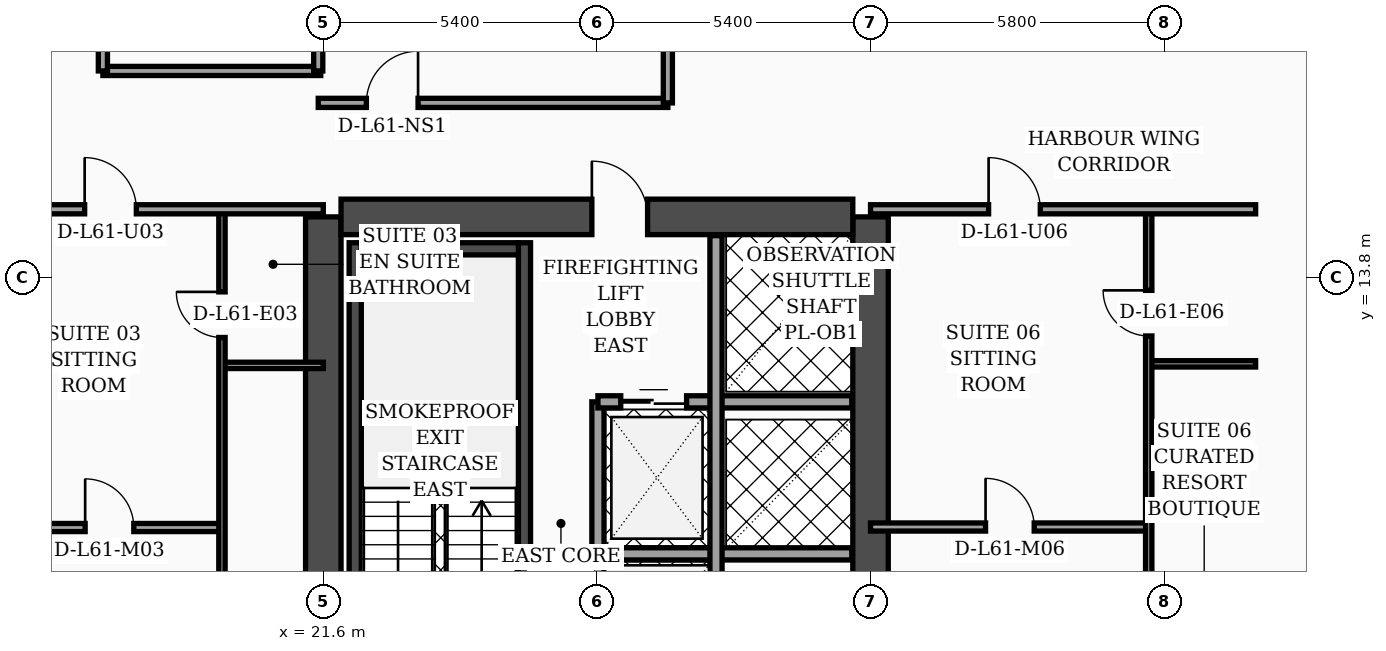
"""IFC4 building model, lengths in metres.
Left out: names, types, materials, properties, quantities, classifications, styles, units other than length and angle.
Written with IfcOpenShell. Run it as: python <this file> out.ifc"""

import sys

from ifc_helpers import new_model, si_unit, direction, frame, frame_2d, origin, place, context, subcontext, project, spatial, rectangle, extrude, element, fill, save


model = new_model("IFC4")
c1 = context("Model", 3, precision=1e-05, world=origin(), true_north=direction((0.0, 1.0)))
c2 = subcontext(c1, "Body", "Model", "MODEL_VIEW")
j1 = project(units=[si_unit("LENGTHUNIT", "METRE"), si_unit("PLANEANGLEUNIT", "RADIAN")], contexts=[c1])
p1 = place(None, origin())
s1 = spatial("IfcSite", under=j1, at=p1, CompositionType="ELEMENT")
p2 = place(p1, origin())
s2 = spatial("IfcBuilding", under=s1, at=p2, CompositionType="ELEMENT")
p3 = place(p2, frame((0.0, 0.0, 247.6)))
s3 = spatial("IfcBuildingStorey", under=s2, at=p3, CompositionType="ELEMENT", Elevation=247.6)
for number, where, z_axis, x_axis in (
    (1, (21.6, 4.6, 0.0), (0.0, 0.0, 1.0), (0.0, 1.0, 0.0)),
    (2, (32.4, 4.6, 0.0), (0.0, 0.0, 1.0), (0.0, 1.0, 0.0)),
):
    element("IfcWall", number, at=place(p3, frame(where, z_axis=z_axis, x_axis=x_axis)), inside=s3, PredefinedType="SHEAR", context=c2, shape_type="SweptSolid", body=[
        extrude(rectangle(XDim=10.4, YDim=0.7, at=frame_2d((5.2, 0.0))), origin(), (0.0, 0.0, 1.0), 3.56),
    ])
p4 = place(p3, frame((21.95, 15.0, 0.0), z_axis=(0.0, 0.0, 1.0), x_axis=(1.0, 0.0, 0.0)))
e3 = element("IfcWall", 3, at=p4, inside=s3, PredefinedType="SHEAR", context=c2, shape_type="SweptSolid", body=[
    extrude(rectangle(XDim=10.1, YDim=0.7, at=frame_2d((5.05, 0.0))), origin(), (0.0, 0.0, 1.0), 3.56),
])
p5 = place(p4, frame((4.95, 0.0, 0.0)))
e4 = element("IfcOpeningElement", 4, at=p5, cuts=e3, PredefinedType="OPENING", context=c2, shape_type="SweptSolid", body=[
    extrude(rectangle(XDim=1.1, YDim=2.2, at=frame_2d((0.55, 1.1))), frame((0.0, 0.36, 0.0), z_axis=(0.0, -1.0, 0.0), x_axis=(1.0, 0.0, 0.0)), (0.0, 0.0, 1.0), 0.72),
])
p6 = place(p3, frame((22.23, 4.95, 0.0), z_axis=(0.0, 0.0, 1.0), x_axis=(0.0, 1.0, 0.0)))
e5 = element("IfcWall", 5, at=p6, inside=s3, PredefinedType="SOLIDWALL", context=c2, shape_type="SweptSolid", body=[
    extrude(rectangle(XDim=9.54, YDim=0.24, at=frame_2d((4.77, 0.0))), origin(), (0.0, 0.0, 1.0), 3.56),
])
p7 = place(p3, frame((25.57, 4.95, 0.0), z_axis=(0.0, 0.0, 1.0), x_axis=(0.0, 1.0, 0.0)))
e6 = element("IfcWall", 6, at=p7, inside=s3, PredefinedType="SOLIDWALL", context=c2, shape_type="SweptSolid", body=[
    extrude(rectangle(XDim=9.54, YDim=0.24, at=frame_2d((4.77, 0.0))), origin(), (0.0, 0.0, 1.0), 3.56),
])
p8 = place(p7, frame((0.35, 0.0, 0.0)))
e7 = element("IfcOpeningElement", 7, at=p8, cuts=e6, PredefinedType="OPENING", context=c2, shape_type="SweptSolid", body=[
    extrude(rectangle(XDim=1.15, YDim=2.2, at=frame_2d((0.575, 1.1))), frame((0.0, 0.13, 0.0), z_axis=(0.0, -1.0, 0.0), x_axis=(1.0, 0.0, 0.0)), (0.0, 0.0, 1.0), 0.26),
])
p9 = place(p3, frame((22.35, 14.37, 0.0), z_axis=(0.0, 0.0, 1.0), x_axis=(1.0, 0.0, 0.0)))
e8 = element("IfcWall", 8, at=p9, inside=s3, PredefinedType="SOLIDWALL", context=c2, shape_type="SweptSolid", body=[
    extrude(rectangle(XDim=3.1, YDim=0.24, at=frame_2d((1.55, 0.0))), origin(), (0.0, 0.0, 1.0), 3.56),
])
p10 = place(p3, frame((46.63, 5.505, 0.0), z_axis=(0.0, 0.0, 1.0), x_axis=(-0.300501856448, 0.953781229775, 0.0)))
e9 = element("IfcWall", 9, at=p10, inside=s3, PredefinedType="SOLIDWALL", context=c2, shape_type="SweptSolid", body=[
    extrude(rectangle(XDim=30.814, YDim=0.32, at=frame_2d((15.407, 0.0))), origin(), (0.0, 0.0, 1.0), 3.56),
])
p11 = place(p10, frame((10.199, 0.0, 0.0)))
e10 = element("IfcOpeningElement", 10, at=p11, cuts=e9, PredefinedType="OPENING", context=c2, shape_type="SweptSolid", body=[
    extrude(rectangle(XDim=1.4, YDim=2.25, at=frame_2d((0.7, 1.125))), frame((0.0, 0.17, 0.0), z_axis=(0.0, -1.0, 0.0), x_axis=(1.0, 0.0, 0.0)), (0.0, 0.0, 1.0), 0.34),
])
p12 = place(p10, frame((4.437, 0.0, 0.7)))
e11 = element("IfcOpeningElement", 11, at=p12, cuts=e9, PredefinedType="OPENING", context=c2, shape_type="SweptSolid", body=[
    extrude(rectangle(XDim=1.6, YDim=1.65, at=frame_2d((0.8, 0.825))), frame((0.0, 0.17, 0.0), z_axis=(0.0, -1.0, 0.0), x_axis=(1.0, 0.0, 0.0)), (0.0, 0.0, 1.0), 0.34),
])
p13 = place(p10, frame((18.696, 0.0, 0.7)))
e12 = element("IfcOpeningElement", 12, at=p13, cuts=e9, PredefinedType="OPENING", context=c2, shape_type="SweptSolid", body=[
    extrude(rectangle(XDim=1.6, YDim=1.65, at=frame_2d((0.8, 0.825))), frame((0.0, 0.17, 0.0), z_axis=(0.0, -1.0, 0.0), x_axis=(1.0, 0.0, 0.0)), (0.0, 0.0, 1.0), 0.34),
])
p14 = place(p10, frame((1.6, 0.0, 0.75)))
e13 = element("IfcOpeningElement", 13, at=p14, cuts=e9, PredefinedType="OPENING", context=c2, shape_type="SweptSolid", body=[
    extrude(rectangle(XDim=1.5, YDim=1.6, at=frame_2d((0.75, 0.8))), frame((0.0, 0.17, 0.0), z_axis=(0.0, -1.0, 0.0), x_axis=(1.0, 0.0, 0.0)), (0.0, 0.0, 1.0), 0.34),
])
p15 = place(p10, frame((7.8, 0.0, 0.75)))
e14 = element("IfcOpeningElement", 14, at=p15, cuts=e9, PredefinedType="OPENING", context=c2, shape_type="SweptSolid", body=[
    extrude(rectangle(XDim=1.5, YDim=1.6, at=frame_2d((0.75, 0.8))), frame((0.0, 0.17, 0.0), z_axis=(0.0, -1.0, 0.0), x_axis=(1.0, 0.0, 0.0)), (0.0, 0.0, 1.0), 0.34),
])
p16 = place(p10, frame((14.0, 0.0, 0.75)))
e15 = element("IfcOpeningElement", 15, at=p16, cuts=e9, PredefinedType="OPENING", context=c2, shape_type="SweptSolid", body=[
    extrude(rectangle(XDim=1.5, YDim=1.6, at=frame_2d((0.75, 0.8))), frame((0.0, 0.17, 0.0), z_axis=(0.0, -1.0, 0.0), x_axis=(1.0, 0.0, 0.0)), (0.0, 0.0, 1.0), 0.34),
])
p17 = place(p10, frame((16.55, 0.0, 0.75)))
e16 = element("IfcOpeningElement", 16, at=p17, cuts=e9, PredefinedType="OPENING", context=c2, shape_type="SweptSolid", body=[
    extrude(rectangle(XDim=1.5, YDim=1.6, at=frame_2d((0.75, 0.8))), frame((0.0, 0.17, 0.0), z_axis=(0.0, -1.0, 0.0), x_axis=(1.0, 0.0, 0.0)), (0.0, 0.0, 1.0), 0.34),
])
p18 = place(p10, frame((20.75, 0.0, 0.75)))
e17 = element("IfcOpeningElement", 17, at=p18, cuts=e9, PredefinedType="OPENING", context=c2, shape_type="SweptSolid", body=[
    extrude(rectangle(XDim=1.5, YDim=1.6, at=frame_2d((0.75, 0.8))), frame((0.0, 0.17, 0.0), z_axis=(0.0, -1.0, 0.0), x_axis=(1.0, 0.0, 0.0)), (0.0, 0.0, 1.0), 0.34),
])
p19 = place(p10, frame((23.3, 0.0, 0.75)))
e18 = element("IfcOpeningElement", 18, at=p19, cuts=e9, PredefinedType="OPENING", context=c2, shape_type="SweptSolid", body=[
    extrude(rectangle(XDim=1.5, YDim=1.6, at=frame_2d((0.75, 0.8))), frame((0.0, 0.17, 0.0), z_axis=(0.0, -1.0, 0.0), x_axis=(1.0, 0.0, 0.0)), (0.0, 0.0, 1.0), 0.34),
])
p20 = place(p10, frame((26.4, 0.0, 0.75)))
e19 = element("IfcOpeningElement", 19, at=p20, cuts=e9, PredefinedType="OPENING", context=c2, shape_type="SweptSolid", body=[
    extrude(rectangle(XDim=1.5, YDim=1.6, at=frame_2d((0.75, 0.8))), frame((0.0, 0.17, 0.0), z_axis=(0.0, -1.0, 0.0), x_axis=(1.0, 0.0, 0.0)), (0.0, 0.0, 1.0), 0.34),
])
p21 = place(p3, frame((27.02, 4.97, 0.0), z_axis=(0.0, 0.0, 1.0), x_axis=(0.0, 1.0, 0.0)))
e20 = element("IfcWall", 20, at=p21, inside=s3, PredefinedType="SOLIDWALL", context=c2, shape_type="SweptSolid", body=[
    extrude(rectangle(XDim=6.38, YDim=0.24, at=frame_2d((3.19, 0.0))), origin(), (0.0, 0.0, 1.0), 3.56),
])
p22 = place(p3, frame((27.02, 11.35, 0.0), z_axis=(0.0, 0.0, 1.0), x_axis=(1.0, 0.0, 0.0)))
e21 = element("IfcWall", 21, at=p22, inside=s3, PredefinedType="SOLIDWALL", context=c2, shape_type="SweptSolid", body=[
    extrude(rectangle(XDim=5.01, YDim=0.24, at=frame_2d((2.505, 0.0))), origin(), (0.0, 0.0, 1.0), 3.56),
])
p23 = place(p22, frame((0.45, 0.0, 0.0)))
e22 = element("IfcOpeningElement", 22, at=p23, cuts=e21, PredefinedType="OPENING", context=c2, shape_type="SweptSolid", body=[
    extrude(rectangle(XDim=1.3, YDim=2.35, at=frame_2d((0.65, 1.175))), frame((0.0, 0.13, 0.0), z_axis=(0.0, -1.0, 0.0), x_axis=(1.0, 0.0, 0.0)), (0.0, 0.0, 1.0), 0.26),
])
p24 = place(p3, frame((27.02, 8.35, 0.0), z_axis=(0.0, 0.0, 1.0), x_axis=(1.0, 0.0, 0.0)))
e23 = element("IfcWall", 23, at=p24, inside=s3, PredefinedType="SOLIDWALL", context=c2, shape_type="SweptSolid", body=[
    extrude(rectangle(XDim=5.01, YDim=0.24, at=frame_2d((2.505, 0.0))), origin(), (0.0, 0.0, 1.0), 3.56),
])
p25 = place(p3, frame((29.35, 4.97, 0.0), z_axis=(0.0, 0.0, 1.0), x_axis=(0.0, 1.0, 0.0)))
e24 = element("IfcWall", 24, at=p25, inside=s3, PredefinedType="SOLIDWALL", context=c2, shape_type="SweptSolid", body=[
    extrude(rectangle(XDim=9.66, YDim=0.24, at=frame_2d((4.83, 0.0))), origin(), (0.0, 0.0, 1.0), 3.56),
])
p26 = place(p25, frame((0.55, 0.0, 0.0)))
e25 = element("IfcOpeningElement", 25, at=p26, cuts=e24, PredefinedType="OPENING", context=c2, shape_type="SweptSolid", body=[
    extrude(rectangle(XDim=1.3, YDim=2.35, at=frame_2d((0.65, 1.175))), frame((0.0, 0.13, 0.0), z_axis=(0.0, -1.0, 0.0), x_axis=(1.0, 0.0, 0.0)), (0.0, 0.0, 1.0), 0.26),
])
p27 = place(p3, frame((19.6, 12.07, 0.0), z_axis=(0.0, 0.0, 1.0), x_axis=(1.0, 0.0, 0.0)))
e26 = element("IfcWall", 26, at=p27, inside=s3, PredefinedType="PARTITIONING", context=c2, shape_type="SweptSolid", body=[
    extrude(rectangle(XDim=2.0, YDim=0.125, at=frame_2d((1.0, 0.0))), origin(), (0.0, 0.0, 1.0), 3.56),
])
p28 = place(p3, frame((15.15, 8.87, 0.0), z_axis=(0.0, 0.0, 1.0), x_axis=(1.0, 0.0, 0.0)))
e27 = element("IfcWall", 27, at=p28, inside=s3, PredefinedType="PARTITIONING", context=c2, shape_type="SweptSolid", body=[
    extrude(rectangle(XDim=4.45, YDim=0.16, at=frame_2d((2.225, 0.0))), origin(), (0.0, 0.0, 1.0), 3.56),
])
p29 = place(p28, frame((1.75, 0.0, 0.0)))
e28 = element("IfcOpeningElement", 28, at=p29, cuts=e27, PredefinedType="OPENING", context=c2, shape_type="SweptSolid", body=[
    extrude(rectangle(XDim=0.96, YDim=2.2, at=frame_2d((0.48, 1.1))), frame((0.0, 0.09, 0.0), z_axis=(0.0, -1.0, 0.0), x_axis=(1.0, 0.0, 0.0)), (0.0, 0.0, 1.0), 0.18),
])
p30 = place(p3, frame((19.6, 2.44, 0.0), z_axis=(0.0, 0.0, 1.0), x_axis=(0.0, 1.0, 0.0)))
e29 = element("IfcWall", 29, at=p30, inside=s3, PredefinedType="PARTITIONING", context=c2, shape_type="SweptSolid", body=[
    extrude(rectangle(XDim=12.71, YDim=0.125, at=frame_2d((6.355, 0.0))), origin(), (0.0, 0.0, 1.0), 2.59),
])
p31 = place(p30, frame((4.34, 0.0, 0.0)))
e30 = element("IfcOpeningElement", 30, at=p31, cuts=e29, PredefinedType="OPENING", context=c2, shape_type="SweptSolid", body=[
    extrude(rectangle(XDim=0.96, YDim=2.2, at=frame_2d((0.48, 1.1))), frame((0.0, 0.073, 0.0), z_axis=(0.0, -1.0, 0.0), x_axis=(1.0, 0.0, 0.0)), (0.0, 0.0, 1.0), 0.145),
])
p32 = place(p30, frame((10.18, 0.0, 0.0)))
e31 = element("IfcOpeningElement", 31, at=p32, cuts=e29, PredefinedType="OPENING", context=c2, shape_type="SweptSolid", body=[
    extrude(rectangle(XDim=0.9, YDim=2.15, at=frame_2d((0.45, 1.075))), frame((0.0, 0.073, 0.0), z_axis=(0.0, -1.0, 0.0), x_axis=(1.0, 0.0, 0.0)), (0.0, 0.0, 1.0), 0.145),
])
p33 = place(p3, frame((15.15, 15.15, 0.0), z_axis=(0.0, 0.0, 1.0), x_axis=(1.0, 0.0, 0.0)))
e32 = element("IfcWall", 32, at=p33, inside=s3, PredefinedType="PARTITIONING", context=c2, shape_type="SweptSolid", body=[
    extrude(rectangle(XDim=6.45, YDim=0.18, at=frame_2d((3.225, 0.0))), origin(), (0.0, 0.0, 1.0), 2.59),
])
p34 = place(p33, frame((1.74, 0.0, 0.0)))
e33 = element("IfcOpeningElement", 33, at=p34, cuts=e32, PredefinedType="OPENING", context=c2, shape_type="SweptSolid", body=[
    extrude(rectangle(XDim=1.02, YDim=2.2, at=frame_2d((0.51, 1.1))), frame((0.0, 0.1, 0.0), z_axis=(0.0, -1.0, 0.0), x_axis=(1.0, 0.0, 0.0)), (0.0, 0.0, 1.0), 0.2),
])
p35 = place(p3, frame((17.25, 17.88, 0.0), z_axis=(0.0, 0.0, 1.0), x_axis=(1.0, 0.0, 0.0)))
e34 = element("IfcWall", 34, at=p35, inside=s3, PredefinedType="PARTITIONING", context=c2, shape_type="SweptSolid", body=[
    extrude(rectangle(XDim=4.3, YDim=0.18, at=frame_2d((2.15, 0.0))), origin(), (0.0, 0.0, 1.0), 3.09),
])
p36 = place(p3, frame((21.5, 17.88, 0.0), z_axis=(0.0, 0.0, 1.0), x_axis=(0.0, 1.0, 0.0)))
e35 = element("IfcWall", 35, at=p36, inside=s3, PredefinedType="PARTITIONING", context=c2, shape_type="SweptSolid", body=[
    extrude(rectangle(XDim=6.44, YDim=0.18, at=frame_2d((3.22, 0.0))), origin(), (0.0, 0.0, 1.0), 3.09),
])
p37 = place(p3, frame((17.25, 17.88, 0.0), z_axis=(0.0, 0.0, 1.0), x_axis=(0.0, 1.0, 0.0)))
e36 = element("IfcWall", 36, at=p37, inside=s3, PredefinedType="PARTITIONING", context=c2, shape_type="SweptSolid", body=[
    extrude(rectangle(XDim=6.44, YDim=0.18, at=frame_2d((3.22, 0.0))), origin(), (0.0, 0.0, 1.0), 3.09),
])
p38 = place(p37, frame((0.65, 0.0, 0.0)))
e37 = element("IfcOpeningElement", 37, at=p38, cuts=e36, PredefinedType="OPENING", context=c2, shape_type="SweptSolid", body=[
    extrude(rectangle(XDim=0.98, YDim=2.15, at=frame_2d((0.49, 1.075))), frame((0.0, 0.1, 0.0), z_axis=(0.0, -1.0, 0.0), x_axis=(1.0, 0.0, 0.0)), (0.0, 0.0, 1.0), 0.2),
])
p39 = place(p37, frame((3.27, 0.0, 0.0)))
e38 = element("IfcOpeningElement", 38, at=p39, cuts=e36, PredefinedType="OPENING", context=c2, shape_type="SweptSolid", body=[
    extrude(rectangle(XDim=0.96, YDim=2.2, at=frame_2d((0.48, 1.1))), frame((0.0, 0.1, 0.0), z_axis=(0.0, -1.0, 0.0), x_axis=(1.0, 0.0, 0.0)), (0.0, 0.0, 1.0), 0.2),
])
p40 = place(p3, frame((37.89, 12.1, 0.0), z_axis=(0.0, 0.0, 1.0), x_axis=(1.0, 0.0, 0.0)))
e39 = element("IfcWall", 39, at=p40, inside=s3, PredefinedType="PARTITIONING", context=c2, shape_type="SweptSolid", body=[
    extrude(rectangle(XDim=2.11, YDim=0.125, at=frame_2d((1.055, 0.0))), origin(), (0.0, 0.0, 1.0), 3.56),
])
p41 = place(p3, frame((32.4, 8.88, 0.0), z_axis=(0.0, 0.0, 1.0), x_axis=(1.0, 0.0, 0.0)))
e40 = element("IfcWall", 40, at=p41, inside=s3, PredefinedType="PARTITIONING", context=c2, shape_type="SweptSolid", body=[
    extrude(rectangle(XDim=5.49, YDim=0.16, at=frame_2d((2.745, 0.0))), origin(), (0.0, 0.0, 1.0), 2.99),
])
p42 = place(p41, frame((2.27, 0.0, 0.0)))
e41 = element("IfcOpeningElement", 41, at=p42, cuts=e40, PredefinedType="OPENING", context=c2, shape_type="SweptSolid", body=[
    extrude(rectangle(XDim=0.96, YDim=2.2, at=frame_2d((0.48, 1.1))), frame((0.0, 0.09, 0.0), z_axis=(0.0, -1.0, 0.0), x_axis=(1.0, 0.0, 0.0)), (0.0, 0.0, 1.0), 0.18),
])
p43 = place(p3, frame((37.89, 2.44, 0.0), z_axis=(0.0, 0.0, 1.0), x_axis=(0.0, 1.0, 0.0)))
e42 = element("IfcWall", 42, at=p43, inside=s3, PredefinedType="PARTITIONING", context=c2, shape_type="SweptSolid", body=[
    extrude(rectangle(XDim=12.71, YDim=0.125, at=frame_2d((6.355, 0.0))), origin(), (0.0, 0.0, 1.0), 2.99),
])
p44 = place(p43, frame((4.35, 0.0, 0.0)))
e43 = element("IfcOpeningElement", 43, at=p44, cuts=e42, PredefinedType="OPENING", context=c2, shape_type="SweptSolid", body=[
    extrude(rectangle(XDim=0.96, YDim=2.2, at=frame_2d((0.48, 1.1))), frame((0.0, 0.073, 0.0), z_axis=(0.0, -1.0, 0.0), x_axis=(1.0, 0.0, 0.0)), (0.0, 0.0, 1.0), 0.145),
])
p45 = place(p43, frame((10.21, 0.0, 0.0)))
e44 = element("IfcOpeningElement", 44, at=p45, cuts=e42, PredefinedType="OPENING", context=c2, shape_type="SweptSolid", body=[
    extrude(rectangle(XDim=0.9, YDim=2.15, at=frame_2d((0.45, 1.075))), frame((0.0, 0.073, 0.0), z_axis=(0.0, -1.0, 0.0), x_axis=(1.0, 0.0, 0.0)), (0.0, 0.0, 1.0), 0.145),
])
p46 = place(p3, frame((32.4, 15.15, 0.0), z_axis=(0.0, 0.0, 1.0), x_axis=(1.0, 0.0, 0.0)))
e45 = element("IfcWall", 45, at=p46, inside=s3, PredefinedType="PARTITIONING", context=c2, shape_type="SweptSolid", body=[
    extrude(rectangle(XDim=7.6, YDim=0.18, at=frame_2d((3.8, 0.0))), origin(), (0.0, 0.0, 1.0), 2.99),
])
p47 = place(p46, frame((2.33, 0.0, 0.0)))
e46 = element("IfcOpeningElement", 46, at=p47, cuts=e45, PredefinedType="OPENING", context=c2, shape_type="SweptSolid", body=[
    extrude(rectangle(XDim=1.02, YDim=2.2, at=frame_2d((0.51, 1.1))), frame((0.0, 0.1, 0.0), z_axis=(0.0, -1.0, 0.0), x_axis=(1.0, 0.0, 0.0)), (0.0, 0.0, 1.0), 0.2),
])
p48 = place(p3, frame((21.5, 17.25, 0.0), z_axis=(0.0, 0.0, 1.0), x_axis=(1.0, 0.0, 0.0)))
e47 = element("IfcWall", 47, at=p48, inside=s3, PredefinedType="PARTITIONING", context=c2, shape_type="SweptSolid", body=[
    extrude(rectangle(XDim=6.9, YDim=0.18, at=frame_2d((3.45, 0.0))), origin(), (0.0, 0.0, 1.0), 2.99),
])
p49 = place(p48, frame((0.95, 0.0, 0.0)))
e48 = element("IfcOpeningElement", 48, at=p49, cuts=e47, PredefinedType="OPENING", context=c2, shape_type="SweptSolid", body=[
    extrude(rectangle(XDim=1.02, YDim=2.2, at=frame_2d((0.51, 1.1))), frame((0.0, 0.1, 0.0), z_axis=(0.0, -1.0, 0.0), x_axis=(1.0, 0.0, 0.0)), (0.0, 0.0, 1.0), 0.2),
])
p50 = place(p3, frame((28.4, 17.25, 0.0), z_axis=(0.0, 0.0, 1.0), x_axis=(0.0, 1.0, 0.0)))
e49 = element("IfcWall", 49, at=p50, inside=s3, PredefinedType="PARTITIONING", context=c2, shape_type="SweptSolid", body=[
    extrude(rectangle(XDim=15.07, YDim=0.18, at=frame_2d((7.535, 0.0))), origin(), (0.0, 0.0, 1.0), 2.99),
])
p51 = place(p23, origin())
e50 = element("IfcDoor", 50, at=p51, inside=s3, OperationType="DOUBLE_DOOR_SLIDING", PredefinedType="DOOR", context=c2, shape_type="SweptSolid", body=[
    extrude(rectangle(XDim=1.3, YDim=2.35, at=frame_2d((0.65, 1.175))), frame((0.0, 0.025, 0.0), z_axis=(0.0, -1.0, 0.0), x_axis=(1.0, 0.0, 0.0)), (0.0, 0.0, 1.0), 0.05),
])
fill(e22, e50)
p52 = place(p29, origin())
e51 = element("IfcDoor", 51, at=p52, inside=s3, OperationType="SINGLE_SWING_LEFT", PredefinedType="DOOR", context=c2, shape_type="SweptSolid", body=[
    extrude(rectangle(XDim=0.96, YDim=2.2, at=frame_2d((0.48, 1.1))), frame((0.0, 0.025, 0.0), z_axis=(0.0, -1.0, 0.0), x_axis=(1.0, 0.0, 0.0)), (0.0, 0.0, 1.0), 0.05),
])
fill(e28, e51)
p53 = place(p32, origin())
e52 = element("IfcDoor", 52, at=p53, inside=s3, OperationType="SINGLE_SWING_RIGHT", PredefinedType="DOOR", context=c2, shape_type="SweptSolid", body=[
    extrude(rectangle(XDim=0.9, YDim=2.15, at=frame_2d((0.45, 1.075))), frame((0.0, 0.025, 0.0), z_axis=(0.0, -1.0, 0.0), x_axis=(1.0, 0.0, 0.0)), (0.0, 0.0, 1.0), 0.05),
])
fill(e31, e52)
p54 = place(p34, origin())
e53 = element("IfcDoor", 53, at=p54, inside=s3, OperationType="SINGLE_SWING_LEFT", PredefinedType="DOOR", context=c2, shape_type="SweptSolid", body=[
    extrude(rectangle(XDim=1.02, YDim=2.2, at=frame_2d((0.51, 1.1))), frame((0.0, 0.025, 0.0), z_axis=(0.0, -1.0, 0.0), x_axis=(1.0, 0.0, 0.0)), (0.0, 0.0, 1.0), 0.05),
])
fill(e33, e53)
p55 = place(p42, origin())
e54 = element("IfcDoor", 54, at=p55, inside=s3, OperationType="SINGLE_SWING_LEFT", PredefinedType="DOOR", context=c2, shape_type="SweptSolid", body=[
    extrude(rectangle(XDim=0.96, YDim=2.2, at=frame_2d((0.48, 1.1))), frame((0.0, 0.025, 0.0), z_axis=(0.0, -1.0, 0.0), x_axis=(1.0, 0.0, 0.0)), (0.0, 0.0, 1.0), 0.05),
])
fill(e41, e54)
p56 = place(p45, origin())
e55 = element("IfcDoor", 55, at=p56, inside=s3, OperationType="SINGLE_SWING_RIGHT", PredefinedType="DOOR", context=c2, shape_type="SweptSolid", body=[
    extrude(rectangle(XDim=0.9, YDim=2.15, at=frame_2d((0.45, 1.075))), frame((0.0, 0.025, 0.0), z_axis=(0.0, -1.0, 0.0), x_axis=(1.0, 0.0, 0.0)), (0.0, 0.0, 1.0), 0.05),
])
fill(e44, e55)
p57 = place(p47, origin())
e56 = element("IfcDoor", 56, at=p57, inside=s3, OperationType="SINGLE_SWING_LEFT", PredefinedType="DOOR", context=c2, shape_type="SweptSolid", body=[
    extrude(rectangle(XDim=1.02, YDim=2.2, at=frame_2d((0.51, 1.1))), frame((0.0, 0.025, 0.0), z_axis=(0.0, -1.0, 0.0), x_axis=(1.0, 0.0, 0.0)), (0.0, 0.0, 1.0), 0.05),
])
fill(e46, e56)
p58 = place(p49, origin())
e57 = element("IfcDoor", 57, at=p58, inside=s3, OperationType="SINGLE_SWING_RIGHT", PredefinedType="DOOR", context=c2, shape_type="SweptSolid", body=[
    extrude(rectangle(XDim=1.02, YDim=2.2, at=frame_2d((0.51, 1.1))), frame((0.0, 0.025, 0.0), z_axis=(0.0, -1.0, 0.0), x_axis=(1.0, 0.0, 0.0)), (0.0, 0.0, 1.0), 0.05),
])
fill(e48, e57)
p59 = place(p5, origin())
e58 = element("IfcDoor", 58, at=p59, inside=s3, OperationType="SINGLE_SWING_LEFT", PredefinedType="DOOR", context=c2, shape_type="SweptSolid", body=[
    extrude(rectangle(XDim=1.1, YDim=2.2, at=frame_2d((0.55, 1.1))), frame((0.0, 0.025, 0.0), z_axis=(0.0, -1.0, 0.0), x_axis=(1.0, 0.0, 0.0)), (0.0, 0.0, 1.0), 0.05),
])
fill(e4, e58)
save(model, sys.argv[1])
